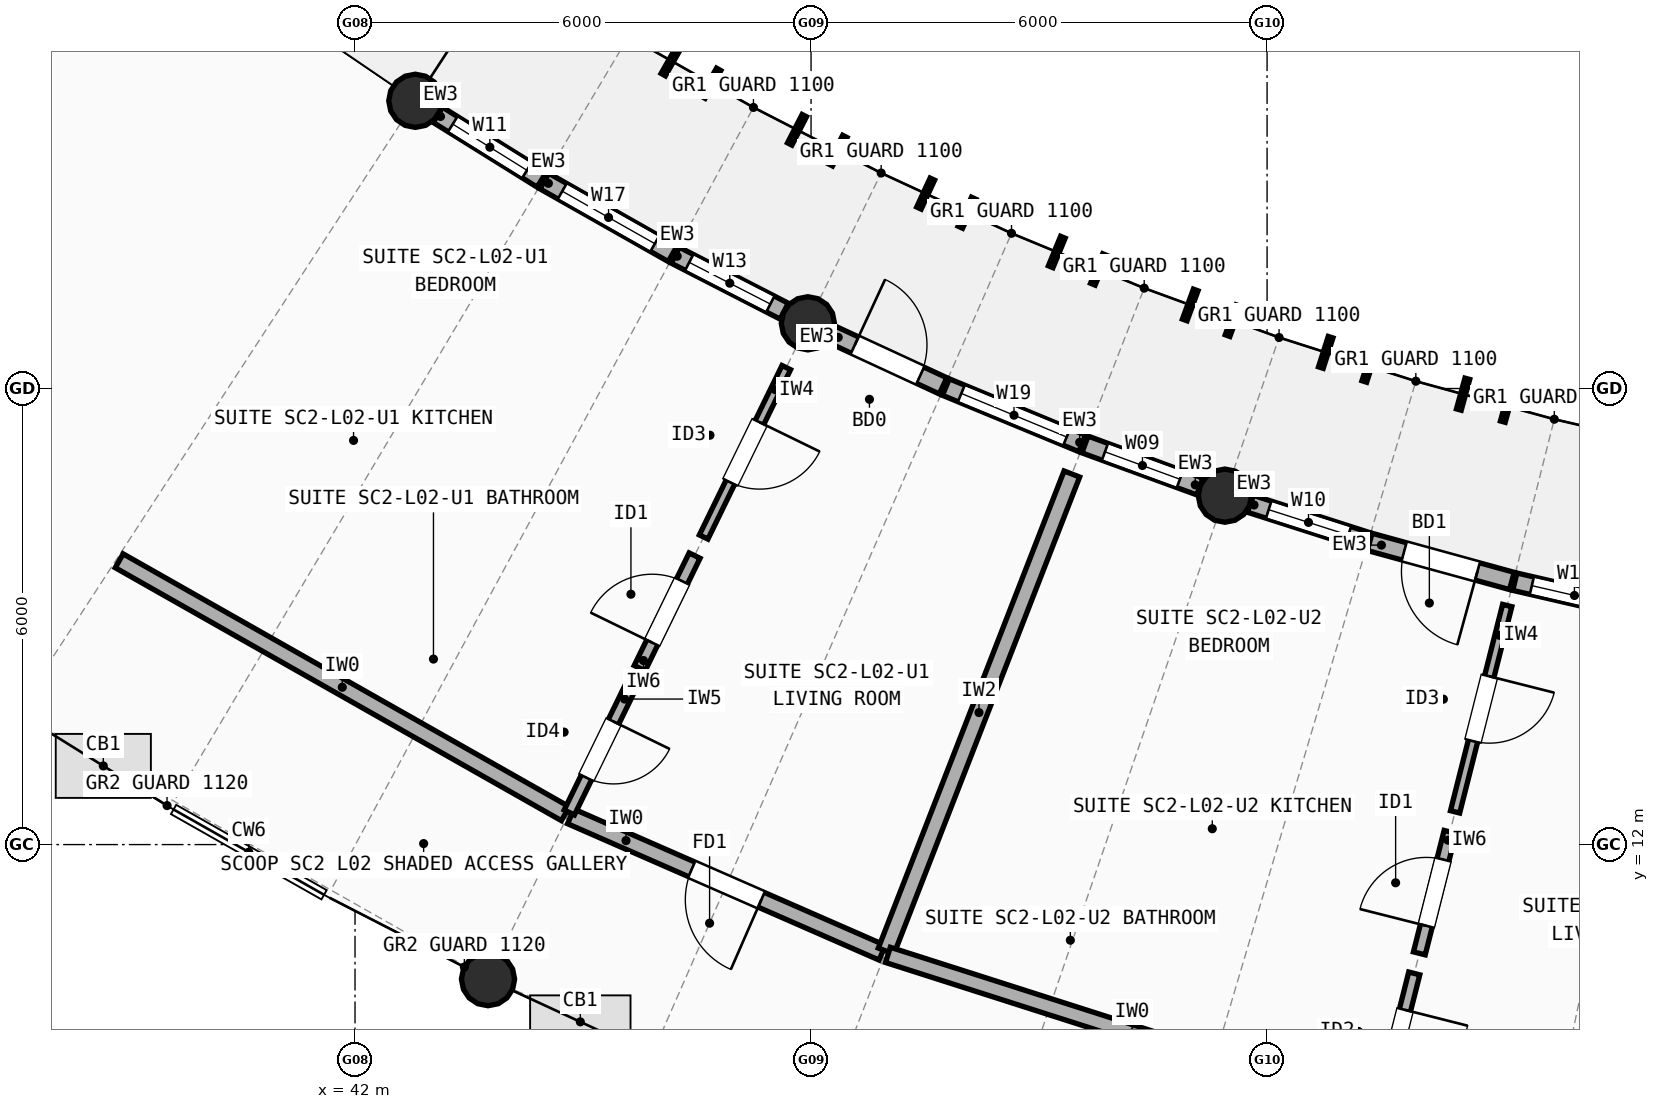
"""IFC4 building model, lengths in metres.
Left out: names, types, materials, properties, quantities, classifications, styles, units other than length and angle.
Written with IfcOpenShell. Run it as: python <this file> out.ifc"""

import sys

from ifc_helpers import new_model, si_unit, direction, frame, frame_2d, origin, origin_2d, place, context, subcontext, project, spatial, rectangle, circle, extrude, element, fill, save


model = new_model("IFC4")
c1 = context("Model", 3, precision=1e-05, world=origin(), true_north=direction((0.0, 1.0)))
c2 = subcontext(c1, "Body", "Model", "MODEL_VIEW")
j1 = project(units=[si_unit("LENGTHUNIT", "METRE"), si_unit("PLANEANGLEUNIT", "RADIAN")], contexts=[c1])
p1 = place(None, origin())
s1 = spatial("IfcSite", under=j1, at=p1, CompositionType="ELEMENT")
p2 = place(p1, origin())
s2 = spatial("IfcBuilding", under=s1, at=p2, CompositionType="ELEMENT")
p3 = place(p2, frame((0.0, 0.0, 7.7)))
s3 = spatial("IfcBuildingStorey", under=s2, at=p3, CompositionType="ELEMENT", Elevation=7.7)
for number, where, z_axis, x_axis in (
    (1, (42.793, 21.785, 0.0), (0.0, 0.0, 1.0), (1.0, 0.0, 0.0)),
    (2, (47.958, 18.858, 0.0), (0.0, 0.0, 1.0), (1.0, 0.0, 0.0)),
    (3, (43.75, 10.229, 0.0), (0.0, 0.0, 1.0), (1.0, 0.0, 0.0)),
    (4, (53.445, 16.59, 0.0), (0.0, 0.0, 1.0), (1.0, 0.0, 0.0)),
):
    element("IfcColumn", number, at=place(p3, frame(where, z_axis=z_axis, x_axis=x_axis)), inside=s3, PredefinedType="COLUMN", context=c2, shape_type="SweptSolid", body=[
        extrude(circle(Radius=0.35, at=origin_2d()), origin(), (0.0, 0.0, 1.0), 2.948),
    ])
p4 = place(p3, frame((43.091, 21.6, 0.0), z_axis=(0.0, 0.0, 1.0), x_axis=(0.848934138406, -0.528498655296, 0.0)))
e5 = element("IfcWall", 5, at=p4, inside=s3, PredefinedType="STANDARD", context=c2, shape_type="SweptSolid", body=[
    extrude(rectangle(XDim=1.61, YDim=0.235, at=frame_2d((0.805, 0.0))), origin(), (0.0, 0.0, 1.0), 2.684),
])
p5 = place(p4, frame((0.23, 0.0, 0.85)))
e6 = element("IfcOpeningElement", 6, at=p5, cuts=e5, PredefinedType="OPENING", context=c2, shape_type="SweptSolid", body=[
    extrude(rectangle(XDim=1.15, YDim=1.45, at=frame_2d((0.575, 0.725))), frame((0.0, 0.127, 0.0), z_axis=(0.0, -1.0, 0.0), x_axis=(1.0, 0.0, 0.0)), (0.0, 0.0, 1.0), 0.255),
])
p6 = place(p3, frame((44.492, 20.729, 0.0), z_axis=(0.0, 0.0, 1.0), x_axis=(0.86993400964, -0.493168144623, 0.0)))
e7 = element("IfcWall", 7, at=p6, inside=s3, PredefinedType="STANDARD", context=c2, shape_type="SweptSolid", body=[
    extrude(rectangle(XDim=1.94, YDim=0.235, at=frame_2d((0.97, 0.0))), origin(), (0.0, 0.0, 1.0), 2.684),
])
p7 = place(p6, frame((0.27, 0.0, 0.85)))
e8 = element("IfcOpeningElement", 8, at=p7, cuts=e7, PredefinedType="OPENING", context=c2, shape_type="SweptSolid", body=[
    extrude(rectangle(XDim=1.4, YDim=1.5, at=frame_2d((0.7, 0.75))), frame((0.0, 0.127, 0.0), z_axis=(0.0, -1.0, 0.0), x_axis=(1.0, 0.0, 0.0)), (0.0, 0.0, 1.0), 0.255),
])
p8 = place(p3, frame((46.215, 19.753, 0.0), z_axis=(0.0, 0.0, 1.0), x_axis=(0.889553696252, -0.456830626693, 0.0)))
e9 = element("IfcWall", 9, at=p8, inside=s3, PredefinedType="STANDARD", context=c2, shape_type="SweptSolid", body=[
    extrude(rectangle(XDim=1.61, YDim=0.235, at=frame_2d((0.805, 0.0))), origin(), (0.0, 0.0, 1.0), 2.684),
])
p9 = place(p8, frame((0.205, 0.0, 0.85)))
e10 = element("IfcOpeningElement", 10, at=p9, cuts=e9, PredefinedType="OPENING", context=c2, shape_type="SweptSolid", body=[
    extrude(rectangle(XDim=1.2, YDim=1.45, at=frame_2d((0.6, 0.725))), frame((0.0, 0.127, 0.0), z_axis=(0.0, -1.0, 0.0), x_axis=(1.0, 0.0, 0.0)), (0.0, 0.0, 1.0), 0.255),
])
p10 = place(p3, frame((48.276, 18.711, 0.0), z_axis=(0.0, 0.0, 1.0), x_axis=(0.907630651946, -0.419769698344, 0.0)))
e11 = element("IfcWall", 11, at=p10, inside=s3, PredefinedType="STANDARD", context=c2, shape_type="SweptSolid", body=[
    extrude(rectangle(XDim=1.61, YDim=0.235, at=frame_2d((0.805, 0.0))), origin(), (0.0, 0.0, 1.0), 2.684),
])
p11 = place(p10, frame((0.33, 0.0, 0.0)))
e12 = element("IfcOpeningElement", 12, at=p11, cuts=e11, PredefinedType="OPENING", context=c2, shape_type="SweptSolid", body=[
    extrude(rectangle(XDim=0.95, YDim=2.12, at=frame_2d((0.475, 1.06))), frame((0.0, 0.127, 0.0), z_axis=(0.0, -1.0, 0.0), x_axis=(1.0, 0.0, 0.0)), (0.0, 0.0, 1.0), 0.255),
])
p12 = place(p3, frame((49.774, 18.019, 0.0), z_axis=(0.0, 0.0, 1.0), x_axis=(0.92414555515, -0.382040564465, 0.0)))
e13 = element("IfcWall", 13, at=p12, inside=s3, PredefinedType="STANDARD", context=c2, shape_type="SweptSolid", body=[
    extrude(rectangle(XDim=1.94, YDim=0.235, at=frame_2d((0.97, 0.0))), origin(), (0.0, 0.0, 1.0), 2.684),
])
p13 = place(p12, frame((0.22, 0.0, 0.85)))
e14 = element("IfcOpeningElement", 14, at=p13, cuts=e13, PredefinedType="OPENING", context=c2, shape_type="SweptSolid", body=[
    extrude(rectangle(XDim=1.5, YDim=1.5, at=frame_2d((0.75, 0.75))), frame((0.0, 0.127, 0.0), z_axis=(0.0, -1.0, 0.0), x_axis=(1.0, 0.0, 0.0)), (0.0, 0.0, 1.0), 0.255),
])
p14 = place(p3, frame((51.604, 17.264, 0.0), z_axis=(0.0, 0.0, 1.0), x_axis=(0.939176538502, -0.34343475294, 0.0)))
e15 = element("IfcWall", 15, at=p14, inside=s3, PredefinedType="STANDARD", context=c2, shape_type="SweptSolid", body=[
    extrude(rectangle(XDim=1.61, YDim=0.235, at=frame_2d((0.805, 0.0))), origin(), (0.0, 0.0, 1.0), 2.684),
])
p15 = place(p14, frame((0.28, 0.0, 0.85)))
e16 = element("IfcOpeningElement", 16, at=p15, cuts=e15, PredefinedType="OPENING", context=c2, shape_type="SweptSolid", body=[
    extrude(rectangle(XDim=1.05, YDim=1.35, at=frame_2d((0.525, 0.675))), frame((0.0, 0.127, 0.0), z_axis=(0.0, -1.0, 0.0), x_axis=(1.0, 0.0, 0.0)), (0.0, 0.0, 1.0), 0.255),
])
p16 = place(p3, frame((53.778, 16.484, 0.0), z_axis=(0.0, 0.0, 1.0), x_axis=(0.952508629145, -0.304511594861, 0.0)))
e17 = element("IfcWall", 17, at=p16, inside=s3, PredefinedType="STANDARD", context=c2, shape_type="SweptSolid", body=[
    extrude(rectangle(XDim=1.61, YDim=0.235, at=frame_2d((0.805, 0.0))), origin(), (0.0, 0.0, 1.0), 2.684),
])
p17 = place(p16, frame((0.255, 0.0, 0.85)))
e18 = element("IfcOpeningElement", 18, at=p17, cuts=e17, PredefinedType="OPENING", context=c2, shape_type="SweptSolid", body=[
    extrude(rectangle(XDim=1.1, YDim=1.45, at=frame_2d((0.55, 0.725))), frame((0.0, 0.127, 0.0), z_axis=(0.0, -1.0, 0.0), x_axis=(1.0, 0.0, 0.0)), (0.0, 0.0, 1.0), 0.255),
])
p18 = place(p3, frame((55.35, 15.982, 0.0), z_axis=(0.0, 0.0, 1.0), x_axis=(0.964271323293, -0.264916619098, 0.0)))
e19 = element("IfcWall", 19, at=p18, inside=s3, PredefinedType="STANDARD", context=c2, shape_type="SweptSolid", body=[
    extrude(rectangle(XDim=1.94, YDim=0.235, at=frame_2d((0.97, 0.0))), origin(), (0.0, 0.0, 1.0), 2.684),
])
p19 = place(p18, frame((0.47, 0.0, 0.0)))
e20 = element("IfcOpeningElement", 20, at=p19, cuts=e19, PredefinedType="OPENING", context=c2, shape_type="SweptSolid", body=[
    extrude(rectangle(XDim=1.0, YDim=2.15, at=frame_2d((0.5, 1.075))), frame((0.0, 0.127, 0.0), z_axis=(0.0, -1.0, 0.0), x_axis=(1.0, 0.0, 0.0)), (0.0, 0.0, 1.0), 0.255),
])
p20 = place(p3, frame((57.26, 15.458, 0.0), z_axis=(0.0, 0.0, 1.0), x_axis=(0.974355406192, -0.225014538249, 0.0)))
e21 = element("IfcWall", 21, at=p20, inside=s3, PredefinedType="STANDARD", context=c2, shape_type="SweptSolid", body=[
    extrude(rectangle(XDim=1.61, YDim=0.235, at=frame_2d((0.805, 0.0))), origin(), (0.0, 0.0, 1.0), 2.684),
])
p21 = place(p20, frame((0.23, 0.0, 0.85)))
e22 = element("IfcOpeningElement", 22, at=p21, cuts=e21, PredefinedType="OPENING", context=c2, shape_type="SweptSolid", body=[
    extrude(rectangle(XDim=1.15, YDim=1.45, at=frame_2d((0.575, 0.725))), frame((0.0, 0.127, 0.0), z_axis=(0.0, -1.0, 0.0), x_axis=(1.0, 0.0, 0.0)), (0.0, 0.0, 1.0), 0.255),
])
p22 = place(p3, frame((38.897, 15.733, 0.0), z_axis=(0.0, 0.0, 1.0), x_axis=(0.86996578951, -0.493112081664, 0.0)))
e23 = element("IfcWall", 23, at=p22, inside=s3, PredefinedType="SOLIDWALL", context=c2, shape_type="SweptSolid", body=[
    extrude(rectangle(XDim=6.747, YDim=0.21, at=frame_2d((3.374, 0.0))), origin(), (0.0, 0.0, 1.0), 2.722),
])
p23 = place(p3, frame((44.838, 12.371, 0.0), z_axis=(0.0, 0.0, 1.0), x_axis=(0.91610596958, -0.40093621999, 0.0)))
e24 = element("IfcWall", 24, at=p23, inside=s3, PredefinedType="SOLIDWALL", context=c2, shape_type="SweptSolid", body=[
    extrude(rectangle(XDim=4.473, YDim=0.21, at=frame_2d((2.237, 0.0))), origin(), (0.0, 0.0, 1.0), 2.762),
])
p24 = place(p23, frame((1.737, 0.0, 0.0)))
e25 = element("IfcOpeningElement", 25, at=p24, cuts=e24, PredefinedType="OPENING", context=c2, shape_type="SweptSolid", body=[
    extrude(rectangle(XDim=1.0, YDim=2.15, at=frame_2d((0.5, 1.075))), frame((0.0, 0.115, 0.0), z_axis=(0.0, -1.0, 0.0), x_axis=(1.0, 0.0, 0.0)), (0.0, 0.0, 1.0), 0.23),
])
p25 = place(p3, frame((47.674, 18.275, 0.0), z_axis=(0.0, 0.0, 1.0), x_axis=(-0.438371263406, -0.898793989421, 0.0)))
e26 = element("IfcWall", 26, at=p25, inside=s3, PredefinedType="PARTITIONING", context=c2, shape_type="SweptSolid", body=[
    extrude(rectangle(XDim=2.48, YDim=0.125, at=frame_2d((1.24, 0.0))), origin(), (0.0, 0.0, 1.0), 2.742),
])
p26 = place(p25, frame((0.8, 0.0, 0.0)))
e27 = element("IfcOpeningElement", 27, at=p26, cuts=e26, PredefinedType="OPENING", context=c2, shape_type="SweptSolid", body=[
    extrude(rectangle(XDim=0.88, YDim=2.1, at=frame_2d((0.44, 1.05))), frame((0.0, 0.073, 0.0), z_axis=(0.0, -1.0, 0.0), x_axis=(1.0, 0.0, 0.0)), (0.0, 0.0, 1.0), 0.145),
])
p27 = place(p3, frame((46.468, 15.802, 0.0), z_axis=(0.0, 0.0, 1.0), x_axis=(-0.438482002729, -0.898739969782, 0.0)))
e28 = element("IfcWall", 28, at=p27, inside=s3, PredefinedType="PLUMBINGWALL", context=c2, shape_type="SweptSolid", body=[
    extrude(rectangle(XDim=1.648, YDim=0.16, at=frame_2d((0.824, 0.0))), origin(), (0.0, 0.0, 1.0), 2.742),
])
p28 = place(p27, frame((0.374, 0.0, 0.0)))
e29 = element("IfcOpeningElement", 29, at=p28, cuts=e28, PredefinedType="OPENING", context=c2, shape_type="SweptSolid", body=[
    extrude(rectangle(XDim=0.9, YDim=2.1, at=frame_2d((0.45, 1.05))), frame((0.0, 0.09, 0.0), z_axis=(0.0, -1.0, 0.0), x_axis=(1.0, 0.0, 0.0)), (0.0, 0.0, 1.0), 0.18),
])
p29 = place(p3, frame((45.626, 14.076, 0.0), z_axis=(0.0, 0.0, 1.0), x_axis=(-0.438488979871, -0.898736565703, 0.0)))
e30 = element("IfcWall", 30, at=p29, inside=s3, PredefinedType="PARTITIONING", context=c2, shape_type="SweptSolid", body=[
    extrude(rectangle(XDim=1.84, YDim=0.15, at=frame_2d((0.92, 0.0))), origin(), (0.0, 0.0, 1.0), 2.742),
])
p30 = place(p29, frame((0.51, 0.0, 0.0)))
e31 = element("IfcOpeningElement", 31, at=p30, cuts=e30, PredefinedType="OPENING", context=c2, shape_type="SweptSolid", body=[
    extrude(rectangle(XDim=0.82, YDim=2.08, at=frame_2d((0.41, 1.04))), frame((0.0, 0.085, 0.0), z_axis=(0.0, -1.0, 0.0), x_axis=(1.0, 0.0, 0.0)), (0.0, 0.0, 1.0), 0.17),
])
p31 = place(p3, frame((51.431, 16.875, 0.0), z_axis=(0.0, 0.0, 1.0), x_axis=(-0.362801288891, -0.931866527341, 0.0)))
e32 = element("IfcWall", 32, at=p31, inside=s3, PredefinedType="SOLIDWALL", context=c2, shape_type="SweptSolid", body=[
    extrude(rectangle(XDim=6.736, YDim=0.22, at=frame_2d((3.368, 0.0))), origin(), (0.0, 0.0, 1.0), 2.722),
])
p32 = place(p3, frame((49.011, 10.549, 0.0), z_axis=(0.0, 0.0, 1.0), x_axis=(0.952529122406, -0.304447484746, 0.0)))
e33 = element("IfcWall", 33, at=p32, inside=s3, PredefinedType="SOLIDWALL", context=c2, shape_type="SweptSolid", body=[
    extrude(rectangle(XDim=6.747, YDim=0.21, at=frame_2d((3.374, 0.0))), origin(), (0.0, 0.0, 1.0), 2.742),
])
p33 = place(p3, frame((57.16, 15.145, 0.0), z_axis=(0.0, 0.0, 1.0), x_axis=(-0.245017317517, -0.969518702304, 0.0)))
e34 = element("IfcWall", 34, at=p33, inside=s3, PredefinedType="PARTITIONING", context=c2, shape_type="SweptSolid", body=[
    extrude(rectangle(XDim=2.8, YDim=0.125, at=frame_2d((1.4, 0.0))), origin(), (0.0, 0.0, 1.0), 2.722),
])
p34 = place(p33, frame((0.96, 0.0, 0.0)))
e35 = element("IfcOpeningElement", 35, at=p34, cuts=e34, PredefinedType="OPENING", context=c2, shape_type="SweptSolid", body=[
    extrude(rectangle(XDim=0.88, YDim=2.1, at=frame_2d((0.44, 1.05))), frame((0.0, 0.073, 0.0), z_axis=(0.0, -1.0, 0.0), x_axis=(1.0, 0.0, 0.0)), (0.0, 0.0, 1.0), 0.145),
])
p35 = place(p3, frame((56.407, 12.167, 0.0), z_axis=(0.0, 0.0, 1.0), x_axis=(-0.245044695728, -0.969511782855, 0.0)))
e36 = element("IfcWall", 36, at=p35, inside=s3, PredefinedType="PLUMBINGWALL", context=c2, shape_type="SweptSolid", body=[
    extrude(rectangle(XDim=1.648, YDim=0.16, at=frame_2d((0.824, 0.0))), origin(), (0.0, 0.0, 1.0), 2.722),
])
p36 = place(p35, frame((0.374, 0.0, 0.0)))
e37 = element("IfcOpeningElement", 37, at=p36, cuts=e36, PredefinedType="OPENING", context=c2, shape_type="SweptSolid", body=[
    extrude(rectangle(XDim=0.9, YDim=2.1, at=frame_2d((0.45, 1.05))), frame((0.0, 0.09, 0.0), z_axis=(0.0, -1.0, 0.0), x_axis=(1.0, 0.0, 0.0)), (0.0, 0.0, 1.0), 0.18),
])
p37 = place(p3, frame((55.937, 10.305, 0.0), z_axis=(0.0, 0.0, 1.0), x_axis=(-0.24497035727, -0.969530568914, 0.0)))
e38 = element("IfcWall", 38, at=p37, inside=s3, PredefinedType="PARTITIONING", context=c2, shape_type="SweptSolid", body=[
    extrude(rectangle(XDim=1.84, YDim=0.15, at=frame_2d((0.92, 0.0))), origin(), (0.0, 0.0, 1.0), 2.722),
])
p38 = place(p37, frame((0.495, 0.0, 0.0)))
e39 = element("IfcOpeningElement", 39, at=p38, cuts=e38, PredefinedType="OPENING", context=c2, shape_type="SweptSolid", body=[
    extrude(rectangle(XDim=0.85, YDim=2.1, at=frame_2d((0.425, 1.05))), frame((0.0, 0.085, 0.0), z_axis=(0.0, -1.0, 0.0), x_axis=(1.0, 0.0, 0.0)), (0.0, 0.0, 1.0), 0.17),
])
p39 = place(p5, origin())
e40 = element("IfcWindow", 40, at=p39, inside=s3, PartitioningType="SINGLE_PANEL", PredefinedType="WINDOW", context=c2, shape_type="SweptSolid", body=[
    extrude(rectangle(XDim=1.15, YDim=1.45, at=frame_2d((0.575, 0.725))), frame((0.0, 0.03, 0.0), z_axis=(0.0, -1.0, 0.0), x_axis=(1.0, 0.0, 0.0)), (0.0, 0.0, 1.0), 0.06),
])
fill(e6, e40)
p40 = place(p7, origin())
e41 = element("IfcWindow", 41, at=p40, inside=s3, PartitioningType="SINGLE_PANEL", PredefinedType="WINDOW", context=c2, shape_type="SweptSolid", body=[
    extrude(rectangle(XDim=1.4, YDim=1.5, at=frame_2d((0.7, 0.75))), frame((0.0, 0.03, 0.0), z_axis=(0.0, -1.0, 0.0), x_axis=(1.0, 0.0, 0.0)), (0.0, 0.0, 1.0), 0.06),
])
fill(e8, e41)
p41 = place(p9, origin())
e42 = element("IfcWindow", 42, at=p41, inside=s3, PartitioningType="SINGLE_PANEL", PredefinedType="WINDOW", context=c2, shape_type="SweptSolid", body=[
    extrude(rectangle(XDim=1.2, YDim=1.45, at=frame_2d((0.6, 0.725))), frame((0.0, 0.03, 0.0), z_axis=(0.0, -1.0, 0.0), x_axis=(1.0, 0.0, 0.0)), (0.0, 0.0, 1.0), 0.06),
])
fill(e10, e42)
p42 = place(p11, origin())
e43 = element("IfcDoor", 43, at=p42, inside=s3, OperationType="SINGLE_SWING_LEFT", PredefinedType="DOOR", context=c2, shape_type="SweptSolid", body=[
    extrude(rectangle(XDim=0.95, YDim=2.12, at=frame_2d((0.475, 1.06))), frame((0.0, 0.025, 0.0), z_axis=(0.0, -1.0, 0.0), x_axis=(1.0, 0.0, 0.0)), (0.0, 0.0, 1.0), 0.05),
])
fill(e12, e43)
p43 = place(p13, origin())
e44 = element("IfcWindow", 44, at=p43, inside=s3, PartitioningType="SINGLE_PANEL", PredefinedType="WINDOW", context=c2, shape_type="SweptSolid", body=[
    extrude(rectangle(XDim=1.5, YDim=1.5, at=frame_2d((0.75, 0.75))), frame((0.0, 0.03, 0.0), z_axis=(0.0, -1.0, 0.0), x_axis=(1.0, 0.0, 0.0)), (0.0, 0.0, 1.0), 0.06),
])
fill(e14, e44)
p44 = place(p15, origin())
e45 = element("IfcWindow", 45, at=p44, inside=s3, PartitioningType="SINGLE_PANEL", PredefinedType="WINDOW", context=c2, shape_type="SweptSolid", body=[
    extrude(rectangle(XDim=1.05, YDim=1.35, at=frame_2d((0.525, 0.675))), frame((0.0, 0.03, 0.0), z_axis=(0.0, -1.0, 0.0), x_axis=(1.0, 0.0, 0.0)), (0.0, 0.0, 1.0), 0.06),
])
fill(e16, e45)
p45 = place(p17, origin())
e46 = element("IfcWindow", 46, at=p45, inside=s3, PartitioningType="SINGLE_PANEL", PredefinedType="WINDOW", context=c2, shape_type="SweptSolid", body=[
    extrude(rectangle(XDim=1.1, YDim=1.45, at=frame_2d((0.55, 0.725))), frame((0.0, 0.03, 0.0), z_axis=(0.0, -1.0, 0.0), x_axis=(1.0, 0.0, 0.0)), (0.0, 0.0, 1.0), 0.06),
])
fill(e18, e46)
p46 = place(p19, origin())
e47 = element("IfcDoor", 47, at=p46, inside=s3, OperationType="SINGLE_SWING_RIGHT", PredefinedType="DOOR", context=c2, shape_type="SweptSolid", body=[
    extrude(rectangle(XDim=1.0, YDim=2.15, at=frame_2d((0.5, 1.075))), frame((0.0, 0.025, 0.0), z_axis=(0.0, -1.0, 0.0), x_axis=(1.0, 0.0, 0.0)), (0.0, 0.0, 1.0), 0.05),
])
fill(e20, e47)
p47 = place(p21, origin())
e48 = element("IfcWindow", 48, at=p47, inside=s3, PartitioningType="SINGLE_PANEL", PredefinedType="WINDOW", context=c2, shape_type="SweptSolid", body=[
    extrude(rectangle(XDim=1.15, YDim=1.45, at=frame_2d((0.575, 0.725))), frame((0.0, 0.03, 0.0), z_axis=(0.0, -1.0, 0.0), x_axis=(1.0, 0.0, 0.0)), (0.0, 0.0, 1.0), 0.06),
])
fill(e22, e48)
p48 = place(p24, origin())
e49 = element("IfcDoor", 49, at=p48, inside=s3, OperationType="SINGLE_SWING_RIGHT", PredefinedType="DOOR", context=c2, shape_type="SweptSolid", body=[
    extrude(rectangle(XDim=1.0, YDim=2.15, at=frame_2d((0.5, 1.075))), frame((0.0, 0.025, 0.0), z_axis=(0.0, -1.0, 0.0), x_axis=(1.0, 0.0, 0.0)), (0.0, 0.0, 1.0), 0.05),
])
fill(e25, e49)
p49 = place(p26, origin())
e50 = element("IfcDoor", 50, at=p49, inside=s3, OperationType="SINGLE_SWING_LEFT", PredefinedType="DOOR", context=c2, shape_type="SweptSolid", body=[
    extrude(rectangle(XDim=0.88, YDim=2.1, at=frame_2d((0.44, 1.05))), frame((0.0, 0.025, 0.0), z_axis=(0.0, -1.0, 0.0), x_axis=(1.0, 0.0, 0.0)), (0.0, 0.0, 1.0), 0.05),
])
fill(e27, e50)
p50 = place(p28, origin())
e51 = element("IfcDoor", 51, at=p50, inside=s3, OperationType="SINGLE_SWING_RIGHT", PredefinedType="DOOR", context=c2, shape_type="SweptSolid", body=[
    extrude(rectangle(XDim=0.9, YDim=2.1, at=frame_2d((0.45, 1.05))), frame((0.0, 0.025, 0.0), z_axis=(0.0, -1.0, 0.0), x_axis=(1.0, 0.0, 0.0)), (0.0, 0.0, 1.0), 0.05),
])
fill(e29, e51)
p51 = place(p30, origin())
e52 = element("IfcDoor", 52, at=p51, inside=s3, OperationType="SINGLE_SWING_LEFT", PredefinedType="DOOR", context=c2, shape_type="SweptSolid", body=[
    extrude(rectangle(XDim=0.82, YDim=2.08, at=frame_2d((0.41, 1.04))), frame((0.0, 0.025, 0.0), z_axis=(0.0, -1.0, 0.0), x_axis=(1.0, 0.0, 0.0)), (0.0, 0.0, 1.0), 0.05),
])
fill(e31, e52)
p52 = place(p34, origin())
e53 = element("IfcDoor", 53, at=p52, inside=s3, OperationType="SINGLE_SWING_LEFT", PredefinedType="DOOR", context=c2, shape_type="SweptSolid", body=[
    extrude(rectangle(XDim=0.88, YDim=2.1, at=frame_2d((0.44, 1.05))), frame((0.0, 0.025, 0.0), z_axis=(0.0, -1.0, 0.0), x_axis=(1.0, 0.0, 0.0)), (0.0, 0.0, 1.0), 0.05),
])
fill(e35, e53)
p53 = place(p36, origin())
e54 = element("IfcDoor", 54, at=p53, inside=s3, OperationType="SINGLE_SWING_RIGHT", PredefinedType="DOOR", context=c2, shape_type="SweptSolid", body=[
    extrude(rectangle(XDim=0.9, YDim=2.1, at=frame_2d((0.45, 1.05))), frame((0.0, 0.025, 0.0), z_axis=(0.0, -1.0, 0.0), x_axis=(1.0, 0.0, 0.0)), (0.0, 0.0, 1.0), 0.05),
])
fill(e37, e54)
p54 = place(p38, origin())
e55 = element("IfcDoor", 55, at=p54, inside=s3, OperationType="SINGLE_SWING_LEFT", PredefinedType="DOOR", context=c2, shape_type="SweptSolid", body=[
    extrude(rectangle(XDim=0.85, YDim=2.1, at=frame_2d((0.425, 1.05))), frame((0.0, 0.025, 0.0), z_axis=(0.0, -1.0, 0.0), x_axis=(1.0, 0.0, 0.0)), (0.0, 0.0, 1.0), 0.05),
])
fill(e39, e55)
save(model, sys.argv[1])
